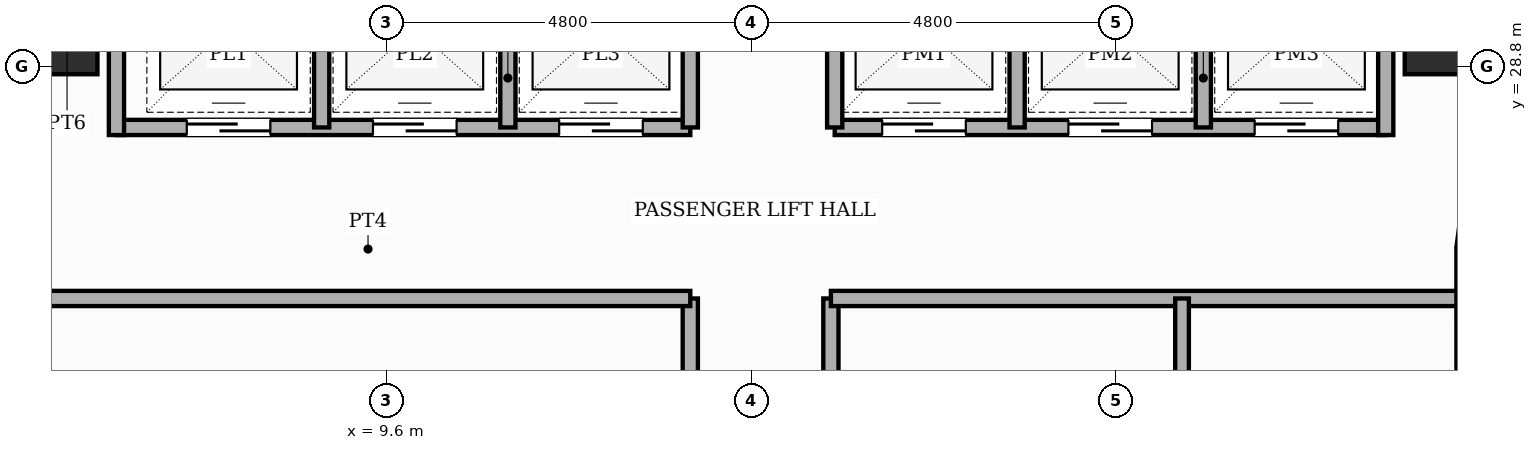
"""IFC4 building model, lengths in metres.
Left out: names, types, materials, properties, quantities, classifications, styles, units other than length and angle.
Written with IfcOpenShell. Run it as: python <this file> out.ifc"""

import sys

from ifc_helpers import new_model, si_unit, direction, frame, frame_2d, origin, origin_2d, place, context, subcontext, project, spatial, rectangle, extrude, element, fill, save


model = new_model("IFC4")
c1 = context("Model", 3, precision=1e-05, world=origin(), true_north=direction((0.0, 1.0)))
c2 = subcontext(c1, "Body", "Model", "MODEL_VIEW")
j1 = project(units=[si_unit("LENGTHUNIT", "METRE"), si_unit("PLANEANGLEUNIT", "RADIAN")], contexts=[c1])
p1 = place(None, origin())
s1 = spatial("IfcSite", under=j1, at=p1, CompositionType="ELEMENT")
p2 = place(p1, origin())
s2 = spatial("IfcBuilding", under=s1, at=p2, CompositionType="ELEMENT")
p3 = place(p2, frame((0.0, 0.0, 97.0)))
s3 = spatial("IfcBuildingStorey", under=s2, at=p3, CompositionType="ELEMENT", Elevation=97.0)
for number, where, z_axis, x_axis in (
    (1, (5.25, 29.25, 0.0), (0.0, 0.0, 1.0), (1.0, 0.0, 0.0)),
    (2, (23.55, 29.25, 0.0), (0.0, 0.0, 1.0), (1.0, 0.0, 0.0)),
):
    element("IfcColumn", number, at=place(p3, frame(where, z_axis=z_axis, x_axis=x_axis)), inside=s3, PredefinedType="COLUMN", context=c2, shape_type="SweptSolid", body=[
        extrude(rectangle(XDim=1.1, YDim=1.1, at=origin_2d()), origin(), (0.0, 0.0, 1.0), 4.8),
    ])
p4 = place(p3, frame((23.923, 27.042, 0.0), z_axis=(0.0, 0.0, 1.0), x_axis=(-0.130555323746, -0.9914410257, 0.0)))
e3 = element("IfcWall", 3, at=p4, inside=s3, PredefinedType="STANDARD", context=c2, shape_type="SweptSolid", body=[
    extrude(rectangle(XDim=0.626, YDim=0.32, at=frame_2d((0.313, 0.0))), origin(), (0.0, 0.0, 1.0), 3.68),
])
p5 = place(p3, frame((23.84, 26.4, 0.0), z_axis=(0.0, 0.0, 1.0), x_axis=(0.0, -1.0, 0.0)))
e4 = element("IfcWall", 4, at=p5, inside=s3, PredefinedType="STANDARD", context=c2, shape_type="SweptSolid", body=[
    extrude(rectangle(XDim=19.2, YDim=0.32, at=frame_2d((9.6, 0.0))), origin(), (0.0, 0.0, 1.0), 3.68),
])
p6 = place(p5, frame((9.88, 0.0, 0.8)))
e5 = element("IfcOpeningElement", 5, at=p6, cuts=e4, PredefinedType="OPENING", context=c2, shape_type="SweptSolid", body=[
    extrude(rectangle(XDim=1.2, YDim=1.8, at=frame_2d((0.6, 0.9))), frame((0.0, 0.17, 0.0), z_axis=(0.0, -1.0, 0.0), x_axis=(1.0, 0.0, 0.0)), (0.0, 0.0, 1.0), 0.34),
])
p7 = place(p5, frame((5.415, 0.0, 0.8)))
e6 = element("IfcOpeningElement", 6, at=p7, cuts=e4, PredefinedType="OPENING", context=c2, shape_type="SweptSolid", body=[
    extrude(rectangle(XDim=0.95, YDim=1.8, at=frame_2d((0.475, 0.9))), frame((0.0, 0.17, 0.0), z_axis=(0.0, -1.0, 0.0), x_axis=(1.0, 0.0, 0.0)), (0.0, 0.0, 1.0), 0.34),
])
p8 = place(p5, frame((0.965, 0.0, 0.45)))
e7 = element("IfcOpeningElement", 7, at=p8, cuts=e4, PredefinedType="OPENING", context=c2, shape_type="SweptSolid", body=[
    extrude(rectangle(XDim=0.6, YDim=1.8, at=frame_2d((0.3, 0.9))), frame((0.0, 0.17, 0.0), z_axis=(0.0, -1.0, 0.0), x_axis=(1.0, 0.0, 0.0)), (0.0, 0.0, 1.0), 0.34),
])
p9 = place(p3, frame((6.05, 28.0, 0.0), z_axis=(0.0, 0.0, 1.0), x_axis=(1.0, 0.0, 0.0)))
e8 = element("IfcWall", 8, at=p9, inside=s3, PredefinedType="POLYGONAL", context=c2, shape_type="SweptSolid", body=[
    extrude(rectangle(XDim=7.55, YDim=0.2, at=frame_2d((3.775, 0.0))), origin(), (0.0, 0.0, 1.0), 4.5),
])
p10 = place(p9, frame((0.925, 0.0, 0.0)))
e9 = element("IfcOpeningElement", 9, at=p10, cuts=e8, PredefinedType="OPENING", context=c2, shape_type="SweptSolid", body=[
    extrude(rectangle(XDim=1.1, YDim=2.15, at=frame_2d((0.55, 1.075))), frame((0.0, 0.11, 0.0), z_axis=(0.0, -1.0, 0.0), x_axis=(1.0, 0.0, 0.0)), (0.0, 0.0, 1.0), 0.22),
])
p11 = place(p9, frame((3.375, 0.0, 0.0)))
e10 = element("IfcOpeningElement", 10, at=p11, cuts=e8, PredefinedType="OPENING", context=c2, shape_type="SweptSolid", body=[
    extrude(rectangle(XDim=1.1, YDim=2.15, at=frame_2d((0.55, 1.075))), frame((0.0, 0.11, 0.0), z_axis=(0.0, -1.0, 0.0), x_axis=(1.0, 0.0, 0.0)), (0.0, 0.0, 1.0), 0.22),
])
p12 = place(p9, frame((5.825, 0.0, 0.0)))
e11 = element("IfcOpeningElement", 11, at=p12, cuts=e8, PredefinedType="OPENING", context=c2, shape_type="SweptSolid", body=[
    extrude(rectangle(XDim=1.1, YDim=2.15, at=frame_2d((0.55, 1.075))), frame((0.0, 0.11, 0.0), z_axis=(0.0, -1.0, 0.0), x_axis=(1.0, 0.0, 0.0)), (0.0, 0.0, 1.0), 0.22),
])
p13 = place(p3, frame((15.5, 28.0, 0.0), z_axis=(0.0, 0.0, 1.0), x_axis=(1.0, 0.0, 0.0)))
e12 = element("IfcWall", 12, at=p13, inside=s3, PredefinedType="POLYGONAL", context=c2, shape_type="SweptSolid", body=[
    extrude(rectangle(XDim=7.25, YDim=0.2, at=frame_2d((3.625, 0.0))), origin(), (0.0, 0.0, 1.0), 4.5),
])
p14 = place(p13, frame((0.625, 0.0, 0.0)))
e13 = element("IfcOpeningElement", 13, at=p14, cuts=e12, PredefinedType="OPENING", context=c2, shape_type="SweptSolid", body=[
    extrude(rectangle(XDim=1.1, YDim=2.15, at=frame_2d((0.55, 1.075))), frame((0.0, 0.11, 0.0), z_axis=(0.0, -1.0, 0.0), x_axis=(1.0, 0.0, 0.0)), (0.0, 0.0, 1.0), 0.22),
])
p15 = place(p13, frame((3.075, 0.0, 0.0)))
e14 = element("IfcOpeningElement", 14, at=p15, cuts=e12, PredefinedType="OPENING", context=c2, shape_type="SweptSolid", body=[
    extrude(rectangle(XDim=1.1, YDim=2.15, at=frame_2d((0.55, 1.075))), frame((0.0, 0.11, 0.0), z_axis=(0.0, -1.0, 0.0), x_axis=(1.0, 0.0, 0.0)), (0.0, 0.0, 1.0), 0.22),
])
p16 = place(p13, frame((5.525, 0.0, 0.0)))
e15 = element("IfcOpeningElement", 15, at=p16, cuts=e12, PredefinedType="OPENING", context=c2, shape_type="SweptSolid", body=[
    extrude(rectangle(XDim=1.1, YDim=2.15, at=frame_2d((0.55, 1.075))), frame((0.0, 0.11, 0.0), z_axis=(0.0, -1.0, 0.0), x_axis=(1.0, 0.0, 0.0)), (0.0, 0.0, 1.0), 0.22),
])
for number, where, z_axis, x_axis in (
    (16, (6.05, 27.9, 0.0), (0.0, 0.0, 1.0), (0.0, 1.0, 0.0)),
    (17, (22.75, 27.9, 0.0), (0.0, 0.0, 1.0), (0.0, 1.0, 0.0)),
):
    element("IfcWall", number, at=place(p3, frame(where, z_axis=z_axis, x_axis=x_axis)), inside=s3, PredefinedType="POLYGONAL", context=c2, shape_type="SweptSolid", body=[
        extrude(rectangle(XDim=3.0, YDim=0.2, at=frame_2d((1.5, 0.0))), origin(), (0.0, 0.0, 1.0), 4.5),
    ])
for number, where, z_axis, x_axis in (
    (18, (13.6, 28.0, 0.0), (0.0, 0.0, 1.0), (0.0, 1.0, 0.0)),
    (19, (15.5, 28.0, 0.0), (0.0, 0.0, 1.0), (0.0, 1.0, 0.0)),
    (20, (8.75, 28.0, 0.0), (0.0, 0.0, 1.0), (0.0, 1.0, 0.0)),
    (21, (11.2, 28.0, 0.0), (0.0, 0.0, 1.0), (0.0, 1.0, 0.0)),
    (22, (17.9, 28.0, 0.0), (0.0, 0.0, 1.0), (0.0, 1.0, 0.0)),
    (23, (20.35, 28.0, 0.0), (0.0, 0.0, 1.0), (0.0, 1.0, 0.0)),
):
    element("IfcWall", number, at=place(p3, frame(where, z_axis=z_axis, x_axis=x_axis)), inside=s3, PredefinedType="POLYGONAL", context=c2, shape_type="SweptSolid", body=[
        extrude(rectangle(XDim=2.9, YDim=0.2, at=frame_2d((1.45, 0.0))), origin(), (0.0, 0.0, 1.0), 4.5),
    ])
p17 = place(p3, frame((13.6, 5.12, 0.0), z_axis=(0.0, 0.0, 1.0), x_axis=(0.0, 1.0, 0.0)))
e24 = element("IfcWall", 24, at=p17, inside=s3, PredefinedType="PARTITIONING", context=c2, shape_type="SweptSolid", body=[
    extrude(rectangle(XDim=20.63, YDim=0.2, at=frame_2d((10.315, 0.0))), origin(), (0.0, 0.0, 1.0), 4.5),
])
p18 = place(p17, frame((13.08, 0.0, 0.0)))
e25 = element("IfcOpeningElement", 25, at=p18, cuts=e24, PredefinedType="OPENING", context=c2, shape_type="SweptSolid", body=[
    extrude(rectangle(XDim=0.98, YDim=2.18, at=frame_2d((0.49, 1.09))), frame((0.0, 0.11, 0.0), z_axis=(0.0, -1.0, 0.0), x_axis=(1.0, 0.0, 0.0)), (0.0, 0.0, 1.0), 0.22),
])
p19 = place(p17, frame((2.04, 0.0, 0.0)))
e26 = element("IfcOpeningElement", 26, at=p19, cuts=e24, PredefinedType="OPENING", context=c2, shape_type="SweptSolid", body=[
    extrude(rectangle(XDim=0.98, YDim=2.18, at=frame_2d((0.49, 1.09))), frame((0.0, 0.11, 0.0), z_axis=(0.0, -1.0, 0.0), x_axis=(1.0, 0.0, 0.0)), (0.0, 0.0, 1.0), 0.22),
])
p20 = place(p3, frame((15.45, 5.12, 0.0), z_axis=(0.0, 0.0, 1.0), x_axis=(0.0, 1.0, 0.0)))
e27 = element("IfcWall", 27, at=p20, inside=s3, PredefinedType="PARTITIONING", context=c2, shape_type="SweptSolid", body=[
    extrude(rectangle(XDim=20.63, YDim=0.2, at=frame_2d((10.315, 0.0))), origin(), (0.0, 0.0, 1.0), 4.5),
])
p21 = place(p20, frame((2.04, 0.0, 0.0)))
e28 = element("IfcOpeningElement", 28, at=p21, cuts=e27, PredefinedType="OPENING", context=c2, shape_type="SweptSolid", body=[
    extrude(rectangle(XDim=0.98, YDim=2.18, at=frame_2d((0.49, 1.09))), frame((0.0, 0.11, 0.0), z_axis=(0.0, -1.0, 0.0), x_axis=(1.0, 0.0, 0.0)), (0.0, 0.0, 1.0), 0.22),
])
p22 = place(p20, frame((12.88, 0.0, 0.0)))
e29 = element("IfcOpeningElement", 29, at=p22, cuts=e27, PredefinedType="OPENING", context=c2, shape_type="SweptSolid", body=[
    extrude(rectangle(XDim=0.95, YDim=2.15, at=frame_2d((0.475, 1.075))), frame((0.0, 0.11, 0.0), z_axis=(0.0, -1.0, 0.0), x_axis=(1.0, 0.0, 0.0)), (0.0, 0.0, 1.0), 0.22),
])
p23 = place(p3, frame((5.12, 25.75, 0.0), z_axis=(0.0, 0.0, 1.0), x_axis=(1.0, 0.0, 0.0)))
e30 = element("IfcWall", 30, at=p23, inside=s3, PredefinedType="PARTITIONING", context=c2, shape_type="SweptSolid", body=[
    extrude(rectangle(XDim=8.48, YDim=0.2, at=frame_2d((4.24, 0.0))), origin(), (0.0, 0.0, 1.0), 4.5),
])
p24 = place(p3, frame((15.45, 25.75, 0.0), z_axis=(0.0, 0.0, 1.0), x_axis=(1.0, 0.0, 0.0)))
e31 = element("IfcWall", 31, at=p24, inside=s3, PredefinedType="PARTITIONING", context=c2, shape_type="SweptSolid", body=[
    extrude(rectangle(XDim=8.23, YDim=0.2, at=frame_2d((4.115, 0.0))), origin(), (0.0, 0.0, 1.0), 4.5),
])
p25 = place(p3, frame((20.07, 16.8, 0.0), z_axis=(0.0, 0.0, 1.0), x_axis=(0.0, 1.0, 0.0)))
e32 = element("IfcWall", 32, at=p25, inside=s3, PredefinedType="PLUMBINGWALL", context=c2, shape_type="SweptSolid", body=[
    extrude(rectangle(XDim=8.95, YDim=0.18, at=frame_2d((4.475, 0.0))), origin(), (0.0, 0.0, 1.0), 4.5),
])
p26 = place(p10, origin())
e33 = element("IfcDoor", 33, at=p26, inside=s3, OperationType="SLIDING_TO_LEFT", PredefinedType="DOOR", context=c2, shape_type="SweptSolid", body=[
    extrude(rectangle(XDim=1.1, YDim=2.15, at=frame_2d((0.55, 1.075))), frame((0.0, 0.025, 0.0), z_axis=(0.0, -1.0, 0.0), x_axis=(1.0, 0.0, 0.0)), (0.0, 0.0, 1.0), 0.05),
])
fill(e9, e33)
p27 = place(p11, origin())
e34 = element("IfcDoor", 34, at=p27, inside=s3, OperationType="SLIDING_TO_RIGHT", PredefinedType="DOOR", context=c2, shape_type="SweptSolid", body=[
    extrude(rectangle(XDim=1.1, YDim=2.15, at=frame_2d((0.55, 1.075))), frame((0.0, 0.025, 0.0), z_axis=(0.0, -1.0, 0.0), x_axis=(1.0, 0.0, 0.0)), (0.0, 0.0, 1.0), 0.05),
])
fill(e10, e34)
p28 = place(p12, origin())
e35 = element("IfcDoor", 35, at=p28, inside=s3, OperationType="SLIDING_TO_LEFT", PredefinedType="DOOR", context=c2, shape_type="SweptSolid", body=[
    extrude(rectangle(XDim=1.1, YDim=2.15, at=frame_2d((0.55, 1.075))), frame((0.0, 0.025, 0.0), z_axis=(0.0, -1.0, 0.0), x_axis=(1.0, 0.0, 0.0)), (0.0, 0.0, 1.0), 0.05),
])
fill(e11, e35)
p29 = place(p14, origin())
e36 = element("IfcDoor", 36, at=p29, inside=s3, OperationType="SLIDING_TO_RIGHT", PredefinedType="DOOR", context=c2, shape_type="SweptSolid", body=[
    extrude(rectangle(XDim=1.1, YDim=2.15, at=frame_2d((0.55, 1.075))), frame((0.0, 0.025, 0.0), z_axis=(0.0, -1.0, 0.0), x_axis=(1.0, 0.0, 0.0)), (0.0, 0.0, 1.0), 0.05),
])
fill(e13, e36)
p30 = place(p15, origin())
e37 = element("IfcDoor", 37, at=p30, inside=s3, OperationType="SLIDING_TO_LEFT", PredefinedType="DOOR", context=c2, shape_type="SweptSolid", body=[
    extrude(rectangle(XDim=1.1, YDim=2.15, at=frame_2d((0.55, 1.075))), frame((0.0, 0.025, 0.0), z_axis=(0.0, -1.0, 0.0), x_axis=(1.0, 0.0, 0.0)), (0.0, 0.0, 1.0), 0.05),
])
fill(e14, e37)
p31 = place(p16, origin())
e38 = element("IfcDoor", 38, at=p31, inside=s3, OperationType="SLIDING_TO_RIGHT", PredefinedType="DOOR", context=c2, shape_type="SweptSolid", body=[
    extrude(rectangle(XDim=1.1, YDim=2.15, at=frame_2d((0.55, 1.075))), frame((0.0, 0.025, 0.0), z_axis=(0.0, -1.0, 0.0), x_axis=(1.0, 0.0, 0.0)), (0.0, 0.0, 1.0), 0.05),
])
fill(e15, e38)
save(model, sys.argv[1])
